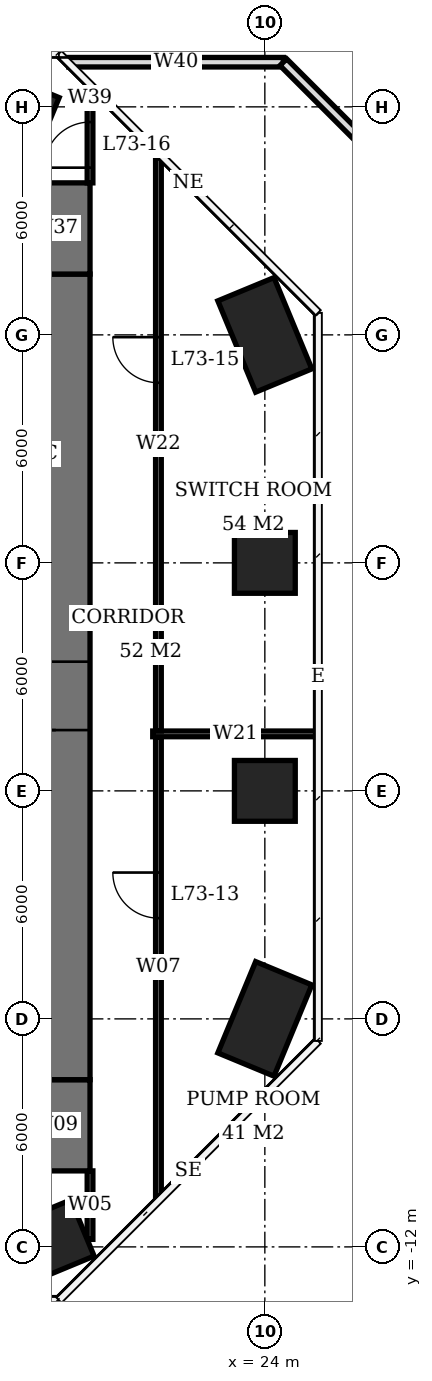
"""IFC4 building model, lengths in metres.
Left out: names, types, materials, properties, quantities, classifications, styles, units other than length and angle.
Written with IfcOpenShell. Run it as: python <this file> out.ifc"""

import sys

from ifc_helpers import new_model, si_unit, direction, frame, frame_2d, origin, origin_2d, place, context, subcontext, project, spatial, rectangle, extrude, element, fill, save


model = new_model("IFC4")
c1 = context("Model", 3, precision=1e-05, world=origin(), true_north=direction((0.0, 1.0)))
c2 = subcontext(c1, "Body", "Model", "MODEL_VIEW")
j1 = project(units=[si_unit("LENGTHUNIT", "METRE"), si_unit("PLANEANGLEUNIT", "RADIAN")], contexts=[c1])
p1 = place(None, origin())
s1 = spatial("IfcSite", under=j1, at=p1, CompositionType="ELEMENT")
p2 = place(p1, origin())
s2 = spatial("IfcBuilding", under=s1, at=p2, CompositionType="ELEMENT")
p3 = place(p2, frame((0.0, 0.0, 295.7)))
s3 = spatial("IfcBuildingStorey", under=s2, at=p3, CompositionType="ELEMENT", Elevation=295.7)
p4 = place(p3, frame((18.0, -12.0, 0.0), z_axis=(0.0, 0.0, 1.0), x_axis=(-0.923879532511, -0.382683432365, 0.0)))
e1 = element("IfcColumn", 1, at=p4, inside=s3, PredefinedType="COLUMN", context=c2, shape_type="SweptSolid", body=[
    extrude(rectangle(XDim=2.6, YDim=1.6, at=origin_2d()), origin(), (0.0, 0.0, 1.0), 5.0),
])
p5 = place(p3, frame((18.0, 18.0, 0.0), z_axis=(0.0, 0.0, 1.0), x_axis=(0.923879532511, -0.382683432365, 0.0)))
e2 = element("IfcColumn", 2, at=p5, inside=s3, PredefinedType="COLUMN", context=c2, shape_type="SweptSolid", body=[
    extrude(rectangle(XDim=0.9, YDim=0.9, at=origin_2d()), origin(), (0.0, 0.0, 1.0), 5.0),
])
p6 = place(p3, frame((24.0, -6.0, 0.0), z_axis=(0.0, 0.0, 1.0), x_axis=(-0.382683432365, -0.923879532511, 0.0)))
e3 = element("IfcColumn", 3, at=p6, inside=s3, PredefinedType="COLUMN", context=c2, shape_type="SweptSolid", body=[
    extrude(rectangle(XDim=2.6, YDim=1.6, at=origin_2d()), origin(), (0.0, 0.0, 1.0), 5.0),
])
for number, where, z_axis, x_axis in (
    (4, (24.0, 0.0, 0.0), (0.0, 0.0, 1.0), (1.0, 0.0, 0.0)),
    (5, (24.0, 6.0, 0.0), (0.0, 0.0, 1.0), (1.0, 0.0, 0.0)),
):
    element("IfcColumn", number, at=place(p3, frame(where, z_axis=z_axis, x_axis=x_axis)), inside=s3, PredefinedType="COLUMN", context=c2, shape_type="SweptSolid", body=[
        extrude(rectangle(XDim=1.6, YDim=1.6, at=origin_2d()), origin(), (0.0, 0.0, 1.0), 5.0),
    ])
p7 = place(p3, frame((24.0, 12.0, 0.0), z_axis=(0.0, 0.0, 1.0), x_axis=(0.382683432365, -0.923879532511, 0.0)))
e6 = element("IfcColumn", 6, at=p7, inside=s3, PredefinedType="COLUMN", context=c2, shape_type="SweptSolid", body=[
    extrude(rectangle(XDim=2.6, YDim=1.6, at=origin_2d()), origin(), (0.0, 0.0, 1.0), 5.0),
])
p8 = place(p3, frame((18.5, -7.6, 0.0), z_axis=(0.0, 0.0, 1.0), x_axis=(0.0, 1.0, 0.0)))
e7 = element("IfcWall", 7, at=p8, inside=s3, PredefinedType="SHEAR", context=c2, shape_type="SweptSolid", body=[
    extrude(rectangle(XDim=21.2, YDim=1.8, at=frame_2d((10.6, 0.0))), origin(), (0.0, 0.0, 1.0), 5.0),
])
p9 = place(p8, frame((9.2, 0.0, 0.0)))
e8 = element("IfcOpeningElement", 8, at=p9, cuts=e7, PredefinedType="OPENING", context=c2, shape_type="SweptSolid", body=[
    extrude(rectangle(XDim=1.8, YDim=2.4, at=frame_2d((0.9, 1.2))), frame((0.0, 0.91, 0.0), z_axis=(0.0, -1.0, 0.0), x_axis=(1.0, 0.0, 0.0)), (0.0, 0.0, 1.0), 1.82),
])
for number, where, z_axis, x_axis in (
    (9, (18.5, -10.0, 0.0), (0.0, 0.0, 1.0), (0.0, 1.0, 0.0)),
    (10, (18.5, 13.6, 0.0), (0.0, 0.0, 1.0), (0.0, 1.0, 0.0)),
):
    element("IfcWall", number, at=place(p3, frame(where, z_axis=z_axis, x_axis=x_axis)), inside=s3, PredefinedType="SHEAR", context=c2, shape_type="SweptSolid", body=[
        extrude(rectangle(XDim=2.4, YDim=1.8, at=frame_2d((1.2, 0.0))), origin(), (0.0, 0.0, 1.0), 5.0),
    ])
for number, where, z_axis, x_axis in (
    (11, (24.487, 19.175, 0.0), (0.0, 0.0, 1.0), (0.707, -0.707, 0.0)),
    (12, (31.175, -12.487, 0.0), (0.0, 0.0, 1.0), (-0.707, -0.707, 0.0)),
):
    element("IfcWall", number, at=place(p3, frame(where, z_axis=z_axis, x_axis=x_axis)), inside=s3, PredefinedType="PARAPET", context=c2, shape_type="SweptSolid", body=[
        extrude(rectangle(XDim=9.458, YDim=0.25, at=frame_2d((4.729, 0.0))), origin(), (0.0, 0.0, 1.0), 1.1),
    ])
p10 = place(p3, frame((18.84, 19.175, 0.0), z_axis=(0.0, 0.0, 1.0), x_axis=(1.0, 0.0, 0.0)))
e13 = element("IfcWall", 13, at=p10, inside=s3, PredefinedType="PARAPET", context=c2, shape_type="SweptSolid", body=[
    extrude(rectangle(XDim=5.646, YDim=0.25, at=frame_2d((2.823, 0.0))), origin(), (0.0, 0.0, 1.0), 1.1),
])
p11 = place(p3, frame((19.4, -11.802, 0.0), z_axis=(0.0, 0.0, 1.0), x_axis=(0.0, 1.0, 0.0)))
e14 = element("IfcWall", 14, at=p11, inside=s3, PredefinedType="PARTITIONING", context=c2, shape_type="SweptSolid", body=[
    extrude(rectangle(XDim=1.802, YDim=0.15, at=frame_2d((0.901, 0.0))), origin(), (0.0, 0.0, 1.0), 4.75),
])
p12 = place(p3, frame((19.4, 16.0, 0.0), z_axis=(0.0, 0.0, 1.0), x_axis=(0.0, 1.0, 0.0)))
e15 = element("IfcWall", 15, at=p12, inside=s3, PredefinedType="PARTITIONING", context=c2, shape_type="SweptSolid", body=[
    extrude(rectangle(XDim=2.489, YDim=0.15, at=frame_2d((1.245, 0.0))), origin(), (0.0, 0.0, 1.0), 4.75),
])
p13 = place(p12, frame((0.4, 0.0, 0.0)))
e16 = element("IfcOpeningElement", 16, at=p13, cuts=e15, PredefinedType="OPENING", context=c2, shape_type="SweptSolid", body=[
    extrude(rectangle(XDim=1.2, YDim=2.4, at=frame_2d((0.6, 1.2))), frame((0.0, 0.085, 0.0), z_axis=(0.0, -1.0, 0.0), x_axis=(1.0, 0.0, 0.0)), (0.0, 0.0, 1.0), 0.17),
])
p14 = place(p3, frame((21.2, -10.689, 0.0), z_axis=(0.0, 0.0, 1.0), x_axis=(0.0, 1.0, 0.0)))
e17 = element("IfcWall", 17, at=p14, inside=s3, PredefinedType="PARTITIONING", context=c2, shape_type="SweptSolid", body=[
    extrude(rectangle(XDim=12.114, YDim=0.15, at=frame_2d((6.057, 0.0))), origin(), (0.0, 0.0, 1.0), 4.75),
])
p15 = place(p14, frame((7.34, 0.0, 0.0)))
e18 = element("IfcOpeningElement", 18, at=p15, cuts=e17, PredefinedType="OPENING", context=c2, shape_type="SweptSolid", body=[
    extrude(rectangle(XDim=1.2, YDim=2.4, at=frame_2d((0.6, 1.2))), frame((0.0, 0.085, 0.0), z_axis=(0.0, -1.0, 0.0), x_axis=(1.0, 0.0, 0.0)), (0.0, 0.0, 1.0), 0.17),
])
p16 = place(p3, frame((21.2, 1.575, 0.0), z_axis=(0.0, 0.0, 1.0), x_axis=(0.0, 1.0, 0.0)))
e19 = element("IfcWall", 19, at=p16, inside=s3, PredefinedType="PARTITIONING", context=c2, shape_type="SweptSolid", body=[
    extrude(rectangle(XDim=15.114, YDim=0.15, at=frame_2d((7.557, 0.0))), origin(), (0.0, 0.0, 1.0), 4.75),
])
p17 = place(p16, frame((9.165, 0.0, 0.0)))
e20 = element("IfcOpeningElement", 20, at=p17, cuts=e19, PredefinedType="OPENING", context=c2, shape_type="SweptSolid", body=[
    extrude(rectangle(XDim=1.2, YDim=2.4, at=frame_2d((0.6, 1.2))), frame((0.0, 0.085, 0.0), z_axis=(0.0, -1.0, 0.0), x_axis=(1.0, 0.0, 0.0)), (0.0, 0.0, 1.0), 0.17),
])
p18 = place(p3, frame((21.05, 1.5, 0.0), z_axis=(0.0, 0.0, 1.0), x_axis=(1.0, 0.0, 0.0)))
e21 = element("IfcWall", 21, at=p18, inside=s3, PredefinedType="PARTITIONING", context=c2, shape_type="SweptSolid", body=[
    extrude(rectangle(XDim=4.35, YDim=0.15, at=frame_2d((2.175, 0.0))), origin(), (0.0, 0.0, 1.0), 4.75),
])
p19 = place(p9, origin())
e22 = element("IfcDoor", 22, at=p19, inside=s3, OperationType="DOUBLE_DOOR_SINGLE_SWING", PredefinedType="DOOR", context=c2, shape_type="SweptSolid", body=[
    extrude(rectangle(XDim=1.8, YDim=2.4, at=frame_2d((0.9, 1.2))), frame((0.0, 0.025, 0.0), z_axis=(0.0, -1.0, 0.0), x_axis=(1.0, 0.0, 0.0)), (0.0, 0.0, 1.0), 0.05),
])
fill(e8, e22)
p20 = place(p15, origin())
e23 = element("IfcDoor", 23, at=p20, inside=s3, OperationType="SINGLE_SWING_RIGHT", PredefinedType="DOOR", context=c2, shape_type="SweptSolid", body=[
    extrude(rectangle(XDim=1.2, YDim=2.4, at=frame_2d((0.6, 1.2))), frame((0.0, 0.025, 0.0), z_axis=(0.0, -1.0, 0.0), x_axis=(1.0, 0.0, 0.0)), (0.0, 0.0, 1.0), 0.05),
])
fill(e18, e23)
p21 = place(p17, origin())
e24 = element("IfcDoor", 24, at=p21, inside=s3, OperationType="SINGLE_SWING_RIGHT", PredefinedType="DOOR", context=c2, shape_type="SweptSolid", body=[
    extrude(rectangle(XDim=1.2, YDim=2.4, at=frame_2d((0.6, 1.2))), frame((0.0, 0.025, 0.0), z_axis=(0.0, -1.0, 0.0), x_axis=(1.0, 0.0, 0.0)), (0.0, 0.0, 1.0), 0.05),
])
fill(e20, e24)
p22 = place(p13, origin())
e25 = element("IfcDoor", 25, at=p22, inside=s3, OperationType="SINGLE_SWING_LEFT", PredefinedType="DOOR", context=c2, shape_type="SweptSolid", body=[
    extrude(rectangle(XDim=1.2, YDim=2.4, at=frame_2d((0.6, 1.2))), frame((0.0, 0.025, 0.0), z_axis=(0.0, -1.0, 0.0), x_axis=(1.0, 0.0, 0.0)), (0.0, 0.0, 1.0), 0.05),
])
fill(e16, e25)
save(model, sys.argv[1])
